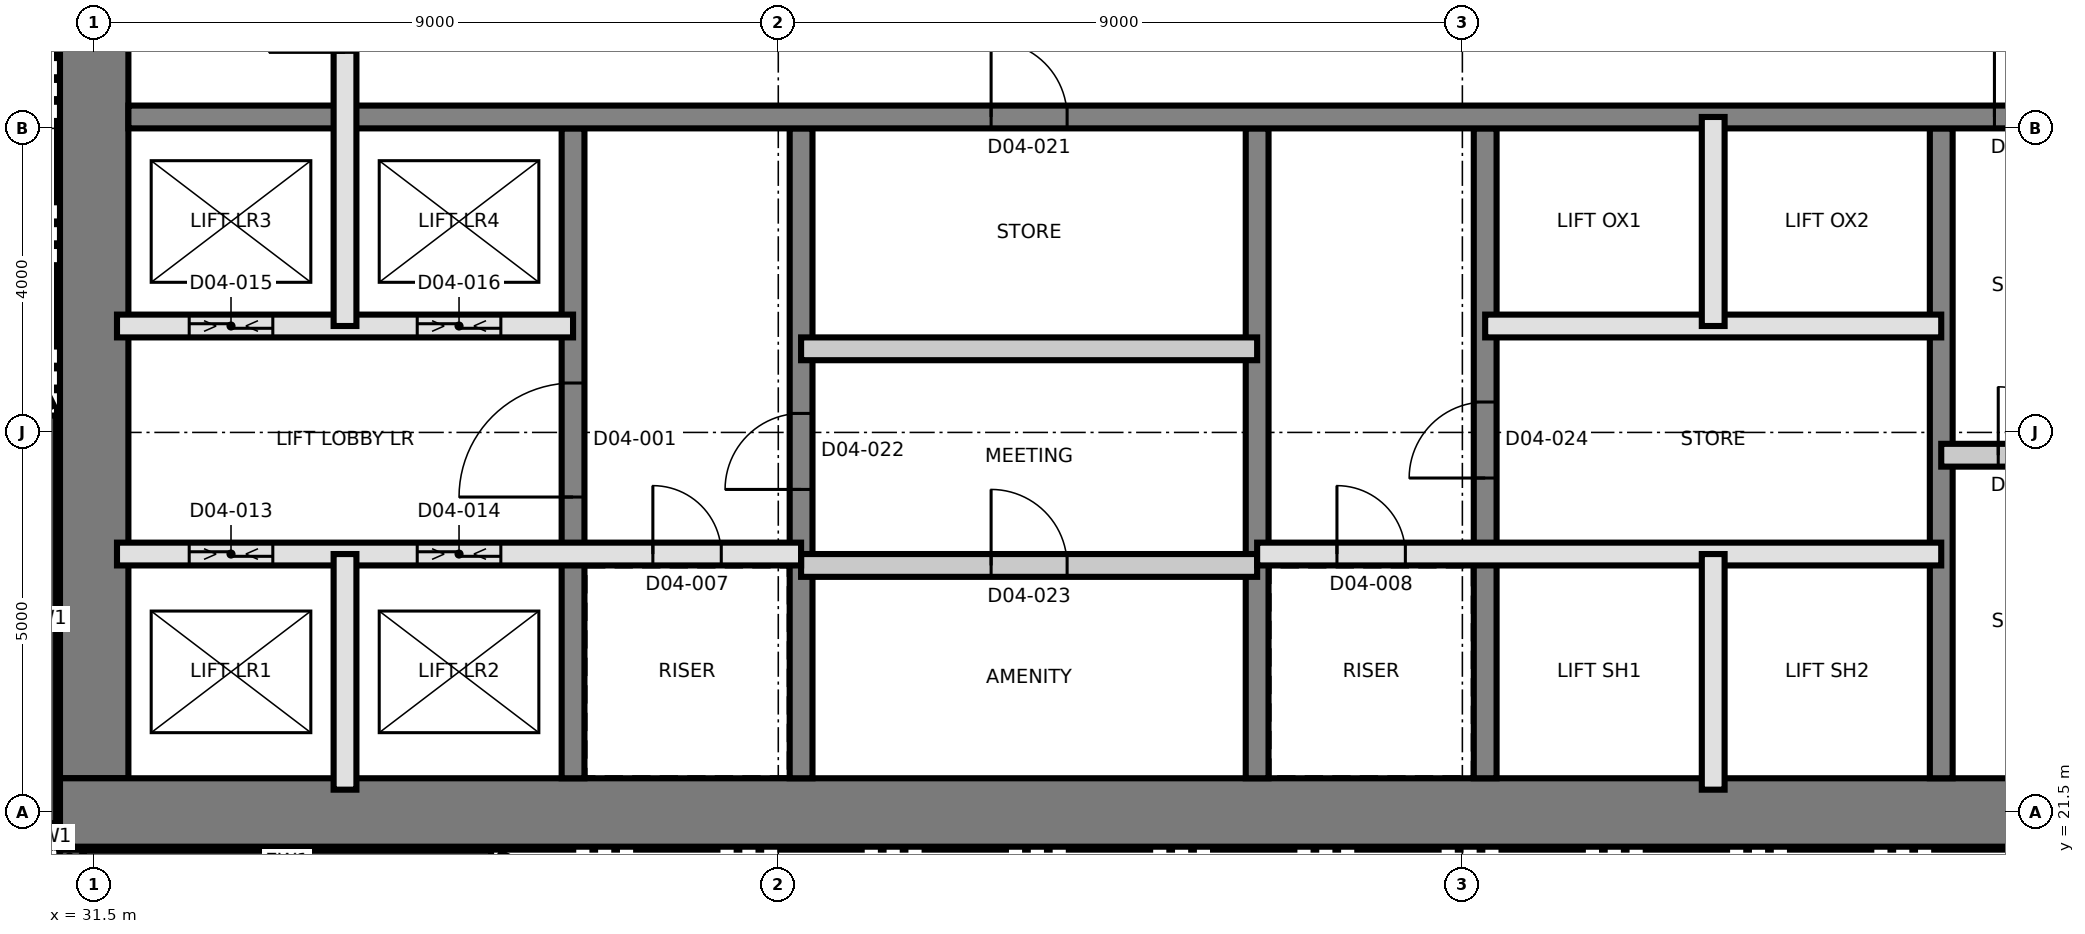
"""IFC4 building model, lengths in metres.
Left out: names, types, materials, properties, quantities, classifications, styles, units other than length and angle.
Written with IfcOpenShell. Run it as: python <this file> out.ifc"""

import sys

from ifc_helpers import new_model, si_unit, direction, frame, frame_2d, origin, place, context, subcontext, project, spatial, rectangle, extrude, element, fill, save


model = new_model("IFC4")
c1 = context("Model", 3, precision=1e-05, world=origin(), true_north=direction((0.0, 1.0)))
c2 = subcontext(c1, "Body", "Model", "MODEL_VIEW")
j1 = project(units=[si_unit("LENGTHUNIT", "METRE"), si_unit("PLANEANGLEUNIT", "RADIAN")], contexts=[c1])
p1 = place(None, origin())
s1 = spatial("IfcSite", under=j1, at=p1, CompositionType="ELEMENT")
p2 = place(p1, origin())
s2 = spatial("IfcBuilding", under=s1, at=p2, CompositionType="ELEMENT")
p3 = place(p2, frame((0.0, 0.0, 63.1)))
s3 = spatial("IfcBuildingStorey", under=s2, at=p3, CompositionType="ELEMENT", Elevation=63.1)
p4 = place(p3, frame((31.5, 21.95, 0.0), z_axis=(0.0, 0.0, 1.0), x_axis=(0.0, 1.0, 0.0)))
e1 = element("IfcWall", 1, at=p4, inside=s3, PredefinedType="SHEAR", context=c2, shape_type="SweptSolid", body=[
    extrude(rectangle(XDim=17.1, YDim=0.9, at=frame_2d((8.55, 0.0))), origin(), (0.0, 0.0, 1.0), 3.7),
])
p5 = place(p3, frame((31.05, 21.5, 0.0), z_axis=(0.0, 0.0, 1.0), x_axis=(1.0, 0.0, 0.0)))
e2 = element("IfcWall", 2, at=p5, inside=s3, PredefinedType="SHEAR", context=c2, shape_type="SweptSolid", body=[
    extrude(rectangle(XDim=27.0, YDim=0.9, at=frame_2d((13.5, 0.0))), origin(), (0.0, 0.0, 1.0), 3.7),
])
p6 = place(p3, frame((37.8, 21.95, 0.0), z_axis=(0.0, 0.0, 1.0), x_axis=(0.0, 1.0, 0.0)))
e3 = element("IfcWall", 3, at=p6, inside=s3, PredefinedType="SHEAR", context=c2, shape_type="SweptSolid", body=[
    extrude(rectangle(XDim=8.55, YDim=0.3, at=frame_2d((4.275, 0.0))), origin(), (0.0, 0.0, 1.0), 3.7),
])
p7 = place(p6, frame((3.7, 0.0, 0.0)))
e4 = element("IfcOpeningElement", 4, at=p7, cuts=e3, PredefinedType="OPENING", context=c2, shape_type="SweptSolid", body=[
    extrude(rectangle(XDim=1.5, YDim=2.1, at=frame_2d((0.75, 1.05))), frame((0.0, 0.16, 0.0), z_axis=(0.0, -1.0, 0.0), x_axis=(1.0, 0.0, 0.0)), (0.0, 0.0, 1.0), 0.32),
])
p8 = place(p3, frame((40.8, 21.95, 0.0), z_axis=(0.0, 0.0, 1.0), x_axis=(0.0, 1.0, 0.0)))
e5 = element("IfcWall", 5, at=p8, inside=s3, PredefinedType="SHEAR", context=c2, shape_type="SweptSolid", body=[
    extrude(rectangle(XDim=8.55, YDim=0.3, at=frame_2d((4.275, 0.0))), origin(), (0.0, 0.0, 1.0), 3.7),
])
p9 = place(p8, frame((3.8, 0.0, 0.0)))
e6 = element("IfcOpeningElement", 6, at=p9, cuts=e5, PredefinedType="OPENING", context=c2, shape_type="SweptSolid", body=[
    extrude(rectangle(XDim=1.0, YDim=2.1, at=frame_2d((0.5, 1.05))), frame((0.0, 0.16, 0.0), z_axis=(0.0, -1.0, 0.0), x_axis=(1.0, 0.0, 0.0)), (0.0, 0.0, 1.0), 0.32),
])
p10 = place(p3, frame((46.8, 21.95, 0.0), z_axis=(0.0, 0.0, 1.0), x_axis=(0.0, 1.0, 0.0)))
e7 = element("IfcWall", 7, at=p10, inside=s3, PredefinedType="SHEAR", context=c2, shape_type="SweptSolid", body=[
    extrude(rectangle(XDim=8.55, YDim=0.3, at=frame_2d((4.275, 0.0))), origin(), (0.0, 0.0, 1.0), 3.7),
])
p11 = place(p3, frame((49.8, 21.95, 0.0), z_axis=(0.0, 0.0, 1.0), x_axis=(0.0, 1.0, 0.0)))
e8 = element("IfcWall", 8, at=p11, inside=s3, PredefinedType="SHEAR", context=c2, shape_type="SweptSolid", body=[
    extrude(rectangle(XDim=8.55, YDim=0.3, at=frame_2d((4.275, 0.0))), origin(), (0.0, 0.0, 1.0), 3.7),
])
p12 = place(p11, frame((3.95, 0.0, 0.0)))
e9 = element("IfcOpeningElement", 9, at=p12, cuts=e8, PredefinedType="OPENING", context=c2, shape_type="SweptSolid", body=[
    extrude(rectangle(XDim=1.0, YDim=2.1, at=frame_2d((0.5, 1.05))), frame((0.0, 0.16, 0.0), z_axis=(0.0, -1.0, 0.0), x_axis=(1.0, 0.0, 0.0)), (0.0, 0.0, 1.0), 0.32),
])
p13 = place(p3, frame((55.8, 21.95, 0.0), z_axis=(0.0, 0.0, 1.0), x_axis=(0.0, 1.0, 0.0)))
e10 = element("IfcWall", 10, at=p13, inside=s3, PredefinedType="SHEAR", context=c2, shape_type="SweptSolid", body=[
    extrude(rectangle(XDim=8.55, YDim=0.3, at=frame_2d((4.275, 0.0))), origin(), (0.0, 0.0, 1.0), 3.7),
])
p14 = place(p3, frame((31.95, 30.65, 0.0), z_axis=(0.0, 0.0, 1.0), x_axis=(1.0, 0.0, 0.0)))
e11 = element("IfcWall", 11, at=p14, inside=s3, PredefinedType="SHEAR", context=c2, shape_type="SweptSolid", body=[
    extrude(rectangle(XDim=26.1, YDim=0.3, at=frame_2d((13.05, 0.0))), origin(), (0.0, 0.0, 1.0), 3.7),
])
p15 = place(p14, frame((24.55, 0.0, 0.0)))
e12 = element("IfcOpeningElement", 12, at=p15, cuts=e11, PredefinedType="OPENING", context=c2, shape_type="SweptSolid", body=[
    extrude(rectangle(XDim=1.0, YDim=2.1, at=frame_2d((0.5, 1.05))), frame((0.0, 0.16, 0.0), z_axis=(0.0, -1.0, 0.0), x_axis=(1.0, 0.0, 0.0)), (0.0, 0.0, 1.0), 0.32),
])
p16 = place(p14, frame((11.35, 0.0, 0.0)))
e13 = element("IfcOpeningElement", 13, at=p16, cuts=e11, PredefinedType="OPENING", context=c2, shape_type="SweptSolid", body=[
    extrude(rectangle(XDim=1.0, YDim=2.1, at=frame_2d((0.5, 1.05))), frame((0.0, 0.16, 0.0), z_axis=(0.0, -1.0, 0.0), x_axis=(1.0, 0.0, 0.0)), (0.0, 0.0, 1.0), 0.32),
])
p17 = place(p3, frame((30.85, 26.722, 0.0), z_axis=(0.0, 0.0, 1.0), x_axis=(0.0, -1.0, 0.0)))
e14 = element("IfcWall", 14, at=p17, inside=s3, PredefinedType="SOLIDWALL", context=c2, shape_type="SweptSolid", body=[
    extrude(rectangle(XDim=5.362, YDim=0.3, at=frame_2d((2.681, 0.0))), origin(), (0.0, 0.0, 1.0), 3.4),
])
for number, where, z_axis, x_axis in (
    (15, (30.861, 21.302, 0.0), (0.0, 0.0, 1.0), (0.383, -0.924, 0.0)),
    (16, (31.048, 20.967, 0.0), (0.0, 0.0, 1.0), (0.924, -0.383, 0.0)),
):
    element("IfcWall", number, at=place(p3, frame(where, z_axis=z_axis, x_axis=x_axis)), inside=s3, PredefinedType="SOLIDWALL", context=c2, shape_type="SweptSolid", body=[
        extrude(rectangle(XDim=0.275, YDim=0.3, at=frame_2d((0.138, 0.0))), origin(), (0.0, 0.0, 1.0), 3.4),
    ])
p18 = place(p3, frame((31.36, 20.85, 0.0), z_axis=(0.0, 0.0, 1.0), x_axis=(1.0, 0.0, 0.0)))
e17 = element("IfcWall", 17, at=p18, inside=s3, PredefinedType="SOLIDWALL", context=c2, shape_type="SweptSolid", body=[
    extrude(rectangle(XDim=5.362, YDim=0.3, at=frame_2d((2.681, 0.0))), origin(), (0.0, 0.0, 1.0), 3.4),
])
for number, where, z_axis, x_axis in (
    (18, (36.788, 20.834, 0.0), (0.0, 0.0, 1.0), (0.897, -0.442, 0.0)),
    (19, (30.119, 28.24, 0.0), (0.0, 0.0, 1.0), (0.442, -0.897, 0.0)),
):
    element("IfcWall", number, at=place(p3, frame(where, z_axis=z_axis, x_axis=x_axis)), inside=s3, PredefinedType="SOLIDWALL", context=c2, shape_type="SweptSolid", body=[
        extrude(rectangle(XDim=1.618, YDim=0.3, at=frame_2d((0.809, 0.0))), origin(), (0.0, 0.0, 1.0), 3.4),
    ])
p19 = place(p3, frame((40.8, 24.75, 0.0), z_axis=(0.0, 0.0, 1.0), x_axis=(1.0, 0.0, 0.0)))
e20 = element("IfcWall", 20, at=p19, inside=s3, PredefinedType="PARTITIONING", context=c2, shape_type="SweptSolid", body=[
    extrude(rectangle(XDim=6.0, YDim=0.3, at=frame_2d((3.0, 0.0))), origin(), (0.0, 0.0, 1.0), 3.4),
])
p20 = place(p19, frame((2.5, 0.0, 0.0)))
e21 = element("IfcOpeningElement", 21, at=p20, cuts=e20, PredefinedType="OPENING", context=c2, shape_type="SweptSolid", body=[
    extrude(rectangle(XDim=1.0, YDim=2.1, at=frame_2d((0.5, 1.05))), frame((0.0, 0.16, 0.0), z_axis=(0.0, -1.0, 0.0), x_axis=(1.0, 0.0, 0.0)), (0.0, 0.0, 1.0), 0.32),
])
p21 = place(p3, frame((31.8, 24.9, 0.0), z_axis=(0.0, 0.0, 1.0), x_axis=(1.0, 0.0, 0.0)))
e22 = element("IfcWall", 22, at=p21, inside=s3, PredefinedType="SOLIDWALL", context=c2, shape_type="SweptSolid", body=[
    extrude(rectangle(XDim=9.0, YDim=0.3, at=frame_2d((4.5, 0.0))), origin(), (0.0, 0.0, 1.0), 3.4),
])
p22 = place(p21, frame((7.05, 0.0, 0.0)))
e23 = element("IfcOpeningElement", 23, at=p22, cuts=e22, PredefinedType="OPENING", context=c2, shape_type="SweptSolid", body=[
    extrude(rectangle(XDim=0.9, YDim=2.1, at=frame_2d((0.45, 1.05))), frame((0.0, 0.16, 0.0), z_axis=(0.0, -1.0, 0.0), x_axis=(1.0, 0.0, 0.0)), (0.0, 0.0, 1.0), 0.32),
])
p23 = place(p21, frame((0.95, 0.0, 0.0)))
e24 = element("IfcOpeningElement", 24, at=p23, cuts=e22, PredefinedType="OPENING", context=c2, shape_type="SweptSolid", body=[
    extrude(rectangle(XDim=1.1, YDim=2.4, at=frame_2d((0.55, 1.2))), frame((0.0, 0.16, 0.0), z_axis=(0.0, -1.0, 0.0), x_axis=(1.0, 0.0, 0.0)), (0.0, 0.0, 1.0), 0.32),
])
p24 = place(p21, frame((3.95, 0.0, 0.0)))
e25 = element("IfcOpeningElement", 25, at=p24, cuts=e22, PredefinedType="OPENING", context=c2, shape_type="SweptSolid", body=[
    extrude(rectangle(XDim=1.1, YDim=2.4, at=frame_2d((0.55, 1.2))), frame((0.0, 0.16, 0.0), z_axis=(0.0, -1.0, 0.0), x_axis=(1.0, 0.0, 0.0)), (0.0, 0.0, 1.0), 0.32),
])
p25 = place(p3, frame((46.8, 24.9, 0.0), z_axis=(0.0, 0.0, 1.0), x_axis=(1.0, 0.0, 0.0)))
e26 = element("IfcWall", 26, at=p25, inside=s3, PredefinedType="SOLIDWALL", context=c2, shape_type="SweptSolid", body=[
    extrude(rectangle(XDim=9.0, YDim=0.3, at=frame_2d((4.5, 0.0))), origin(), (0.0, 0.0, 1.0), 3.4),
])
p26 = place(p25, frame((1.05, 0.0, 0.0)))
e27 = element("IfcOpeningElement", 27, at=p26, cuts=e26, PredefinedType="OPENING", context=c2, shape_type="SweptSolid", body=[
    extrude(rectangle(XDim=0.9, YDim=2.1, at=frame_2d((0.45, 1.05))), frame((0.0, 0.16, 0.0), z_axis=(0.0, -1.0, 0.0), x_axis=(1.0, 0.0, 0.0)), (0.0, 0.0, 1.0), 0.32),
])
p27 = place(p3, frame((55.8, 26.2, 0.0), z_axis=(0.0, 0.0, 1.0), x_axis=(1.0, 0.0, 0.0)))
e28 = element("IfcWall", 28, at=p27, inside=s3, PredefinedType="PARTITIONING", context=c2, shape_type="SweptSolid", body=[
    extrude(rectangle(XDim=2.4, YDim=0.3, at=frame_2d((1.2, 0.0))), origin(), (0.0, 0.0, 1.0), 3.4),
])
p28 = place(p27, frame((0.75, 0.0, 0.0)))
e29 = element("IfcOpeningElement", 29, at=p28, cuts=e28, PredefinedType="OPENING", context=c2, shape_type="SweptSolid", body=[
    extrude(rectangle(XDim=0.9, YDim=2.1, at=frame_2d((0.45, 1.05))), frame((0.0, 0.16, 0.0), z_axis=(0.0, -1.0, 0.0), x_axis=(1.0, 0.0, 0.0)), (0.0, 0.0, 1.0), 0.32),
])
p29 = place(p3, frame((40.8, 27.6, 0.0), z_axis=(0.0, 0.0, 1.0), x_axis=(1.0, 0.0, 0.0)))
e30 = element("IfcWall", 30, at=p29, inside=s3, PredefinedType="PARTITIONING", context=c2, shape_type="SweptSolid", body=[
    extrude(rectangle(XDim=6.0, YDim=0.3, at=frame_2d((3.0, 0.0))), origin(), (0.0, 0.0, 1.0), 3.4),
])
p30 = place(p3, frame((31.8, 27.9, 0.0), z_axis=(0.0, 0.0, 1.0), x_axis=(1.0, 0.0, 0.0)))
e31 = element("IfcWall", 31, at=p30, inside=s3, PredefinedType="SOLIDWALL", context=c2, shape_type="SweptSolid", body=[
    extrude(rectangle(XDim=6.0, YDim=0.3, at=frame_2d((3.0, 0.0))), origin(), (0.0, 0.0, 1.0), 3.4),
])
p31 = place(p30, frame((0.95, 0.0, 0.0)))
e32 = element("IfcOpeningElement", 32, at=p31, cuts=e31, PredefinedType="OPENING", context=c2, shape_type="SweptSolid", body=[
    extrude(rectangle(XDim=1.1, YDim=2.4, at=frame_2d((0.55, 1.2))), frame((0.0, 0.16, 0.0), z_axis=(0.0, -1.0, 0.0), x_axis=(1.0, 0.0, 0.0)), (0.0, 0.0, 1.0), 0.32),
])
p32 = place(p30, frame((3.95, 0.0, 0.0)))
e33 = element("IfcOpeningElement", 33, at=p32, cuts=e31, PredefinedType="OPENING", context=c2, shape_type="SweptSolid", body=[
    extrude(rectangle(XDim=1.1, YDim=2.4, at=frame_2d((0.55, 1.2))), frame((0.0, 0.16, 0.0), z_axis=(0.0, -1.0, 0.0), x_axis=(1.0, 0.0, 0.0)), (0.0, 0.0, 1.0), 0.32),
])
p33 = place(p3, frame((49.8, 27.9, 0.0), z_axis=(0.0, 0.0, 1.0), x_axis=(1.0, 0.0, 0.0)))
e34 = element("IfcWall", 34, at=p33, inside=s3, PredefinedType="SOLIDWALL", context=c2, shape_type="SweptSolid", body=[
    extrude(rectangle(XDim=6.0, YDim=0.3, at=frame_2d((3.0, 0.0))), origin(), (0.0, 0.0, 1.0), 3.4),
])
p34 = place(p3, frame((34.8, 21.8, 0.0), z_axis=(0.0, 0.0, 1.0), x_axis=(0.0, 1.0, 0.0)))
e35 = element("IfcWall", 35, at=p34, inside=s3, PredefinedType="SOLIDWALL", context=c2, shape_type="SweptSolid", body=[
    extrude(rectangle(XDim=3.1, YDim=0.3, at=frame_2d((1.55, 0.0))), origin(), (0.0, 0.0, 1.0), 3.4),
])
p35 = place(p3, frame((34.8, 27.9, 0.0), z_axis=(0.0, 0.0, 1.0), x_axis=(0.0, 1.0, 0.0)))
e36 = element("IfcWall", 36, at=p35, inside=s3, PredefinedType="SOLIDWALL", context=c2, shape_type="SweptSolid", body=[
    extrude(rectangle(XDim=5.45, YDim=0.3, at=frame_2d((2.725, 0.0))), origin(), (0.0, 0.0, 1.0), 3.4),
])
p36 = place(p35, frame((3.6, 0.0, 0.0)))
e37 = element("IfcOpeningElement", 37, at=p36, cuts=e36, PredefinedType="OPENING", context=c2, shape_type="SweptSolid", body=[
    extrude(rectangle(XDim=1.0, YDim=2.1, at=frame_2d((0.5, 1.05))), frame((0.0, 0.16, 0.0), z_axis=(0.0, -1.0, 0.0), x_axis=(1.0, 0.0, 0.0)), (0.0, 0.0, 1.0), 0.32),
])
p37 = place(p3, frame((52.8, 21.8, 0.0), z_axis=(0.0, 0.0, 1.0), x_axis=(0.0, 1.0, 0.0)))
e38 = element("IfcWall", 38, at=p37, inside=s3, PredefinedType="SOLIDWALL", context=c2, shape_type="SweptSolid", body=[
    extrude(rectangle(XDim=3.1, YDim=0.3, at=frame_2d((1.55, 0.0))), origin(), (0.0, 0.0, 1.0), 3.4),
])
p38 = place(p3, frame((52.8, 27.9, 0.0), z_axis=(0.0, 0.0, 1.0), x_axis=(0.0, 1.0, 0.0)))
e39 = element("IfcWall", 39, at=p38, inside=s3, PredefinedType="SOLIDWALL", context=c2, shape_type="SweptSolid", body=[
    extrude(rectangle(XDim=2.75, YDim=0.3, at=frame_2d((1.375, 0.0))), origin(), (0.0, 0.0, 1.0), 3.4),
])
p39 = place(p7, origin())
e40 = element("IfcDoor", 40, at=p39, inside=s3, OperationType="SINGLE_SWING_LEFT", PredefinedType="DOOR", context=c2, shape_type="SweptSolid", body=[
    extrude(rectangle(XDim=1.5, YDim=2.1, at=frame_2d((0.75, 1.05))), frame((0.0, 0.025, 0.0), z_axis=(0.0, -1.0, 0.0), x_axis=(1.0, 0.0, 0.0)), (0.0, 0.0, 1.0), 0.05),
])
fill(e4, e40)
p40 = place(p22, origin())
e41 = element("IfcDoor", 41, at=p40, inside=s3, OperationType="SINGLE_SWING_LEFT", PredefinedType="DOOR", context=c2, shape_type="SweptSolid", body=[
    extrude(rectangle(XDim=0.9, YDim=2.1, at=frame_2d((0.45, 1.05))), frame((0.0, 0.025, 0.0), z_axis=(0.0, -1.0, 0.0), x_axis=(1.0, 0.0, 0.0)), (0.0, 0.0, 1.0), 0.05),
])
fill(e23, e41)
p41 = place(p26, origin())
e42 = element("IfcDoor", 42, at=p41, inside=s3, OperationType="SINGLE_SWING_RIGHT", PredefinedType="DOOR", context=c2, shape_type="SweptSolid", body=[
    extrude(rectangle(XDim=0.9, YDim=2.1, at=frame_2d((0.45, 1.05))), frame((0.0, 0.025, 0.0), z_axis=(0.0, -1.0, 0.0), x_axis=(1.0, 0.0, 0.0)), (0.0, 0.0, 1.0), 0.05),
])
fill(e27, e42)
p42 = place(p15, origin())
e43 = element("IfcDoor", 43, at=p42, inside=s3, OperationType="SINGLE_SWING_LEFT", PredefinedType="DOOR", context=c2, shape_type="SweptSolid", body=[
    extrude(rectangle(XDim=1.0, YDim=2.1, at=frame_2d((0.5, 1.05))), frame((0.0, 0.025, 0.0), z_axis=(0.0, -1.0, 0.0), x_axis=(1.0, 0.0, 0.0)), (0.0, 0.0, 1.0), 0.05),
])
fill(e12, e43)
p43 = place(p28, origin())
e44 = element("IfcDoor", 44, at=p43, inside=s3, OperationType="SINGLE_SWING_RIGHT", PredefinedType="DOOR", context=c2, shape_type="SweptSolid", body=[
    extrude(rectangle(XDim=0.9, YDim=2.1, at=frame_2d((0.45, 1.05))), frame((0.0, 0.025, 0.0), z_axis=(0.0, -1.0, 0.0), x_axis=(1.0, 0.0, 0.0)), (0.0, 0.0, 1.0), 0.05),
])
fill(e29, e44)
p44 = place(p23, origin())
e45 = element("IfcDoor", 45, at=p44, inside=s3, OperationType="SLIDING_TO_LEFT", PredefinedType="DOOR", context=c2, shape_type="SweptSolid", body=[
    extrude(rectangle(XDim=1.1, YDim=2.4, at=frame_2d((0.55, 1.2))), frame((0.0, 0.025, 0.0), z_axis=(0.0, -1.0, 0.0), x_axis=(1.0, 0.0, 0.0)), (0.0, 0.0, 1.0), 0.05),
])
fill(e24, e45)
p45 = place(p24, origin())
e46 = element("IfcDoor", 46, at=p45, inside=s3, OperationType="SLIDING_TO_LEFT", PredefinedType="DOOR", context=c2, shape_type="SweptSolid", body=[
    extrude(rectangle(XDim=1.1, YDim=2.4, at=frame_2d((0.55, 1.2))), frame((0.0, 0.025, 0.0), z_axis=(0.0, -1.0, 0.0), x_axis=(1.0, 0.0, 0.0)), (0.0, 0.0, 1.0), 0.05),
])
fill(e25, e46)
p46 = place(p31, origin())
e47 = element("IfcDoor", 47, at=p46, inside=s3, OperationType="SLIDING_TO_LEFT", PredefinedType="DOOR", context=c2, shape_type="SweptSolid", body=[
    extrude(rectangle(XDim=1.1, YDim=2.4, at=frame_2d((0.55, 1.2))), frame((0.0, 0.025, 0.0), z_axis=(0.0, -1.0, 0.0), x_axis=(1.0, 0.0, 0.0)), (0.0, 0.0, 1.0), 0.05),
])
fill(e32, e47)
p47 = place(p32, origin())
e48 = element("IfcDoor", 48, at=p47, inside=s3, OperationType="SLIDING_TO_LEFT", PredefinedType="DOOR", context=c2, shape_type="SweptSolid", body=[
    extrude(rectangle(XDim=1.1, YDim=2.4, at=frame_2d((0.55, 1.2))), frame((0.0, 0.025, 0.0), z_axis=(0.0, -1.0, 0.0), x_axis=(1.0, 0.0, 0.0)), (0.0, 0.0, 1.0), 0.05),
])
fill(e33, e48)
p48 = place(p16, origin())
e49 = element("IfcDoor", 49, at=p48, inside=s3, OperationType="SINGLE_SWING_LEFT", PredefinedType="DOOR", context=c2, shape_type="SweptSolid", body=[
    extrude(rectangle(XDim=1.0, YDim=2.1, at=frame_2d((0.5, 1.05))), frame((0.0, 0.025, 0.0), z_axis=(0.0, -1.0, 0.0), x_axis=(1.0, 0.0, 0.0)), (0.0, 0.0, 1.0), 0.05),
])
fill(e13, e49)
p49 = place(p9, origin())
e50 = element("IfcDoor", 50, at=p49, inside=s3, OperationType="SINGLE_SWING_RIGHT", PredefinedType="DOOR", context=c2, shape_type="SweptSolid", body=[
    extrude(rectangle(XDim=1.0, YDim=2.1, at=frame_2d((0.5, 1.05))), frame((0.0, 0.025, 0.0), z_axis=(0.0, -1.0, 0.0), x_axis=(1.0, 0.0, 0.0)), (0.0, 0.0, 1.0), 0.05),
])
fill(e6, e50)
p50 = place(p20, origin())
e51 = element("IfcDoor", 51, at=p50, inside=s3, OperationType="SINGLE_SWING_RIGHT", PredefinedType="DOOR", context=c2, shape_type="SweptSolid", body=[
    extrude(rectangle(XDim=1.0, YDim=2.1, at=frame_2d((0.5, 1.05))), frame((0.0, 0.025, 0.0), z_axis=(0.0, -1.0, 0.0), x_axis=(1.0, 0.0, 0.0)), (0.0, 0.0, 1.0), 0.05),
])
fill(e21, e51)
p51 = place(p12, origin())
e52 = element("IfcDoor", 52, at=p51, inside=s3, OperationType="SINGLE_SWING_RIGHT", PredefinedType="DOOR", context=c2, shape_type="SweptSolid", body=[
    extrude(rectangle(XDim=1.0, YDim=2.1, at=frame_2d((0.5, 1.05))), frame((0.0, 0.025, 0.0), z_axis=(0.0, -1.0, 0.0), x_axis=(1.0, 0.0, 0.0)), (0.0, 0.0, 1.0), 0.05),
])
fill(e9, e52)
save(model, sys.argv[1])
